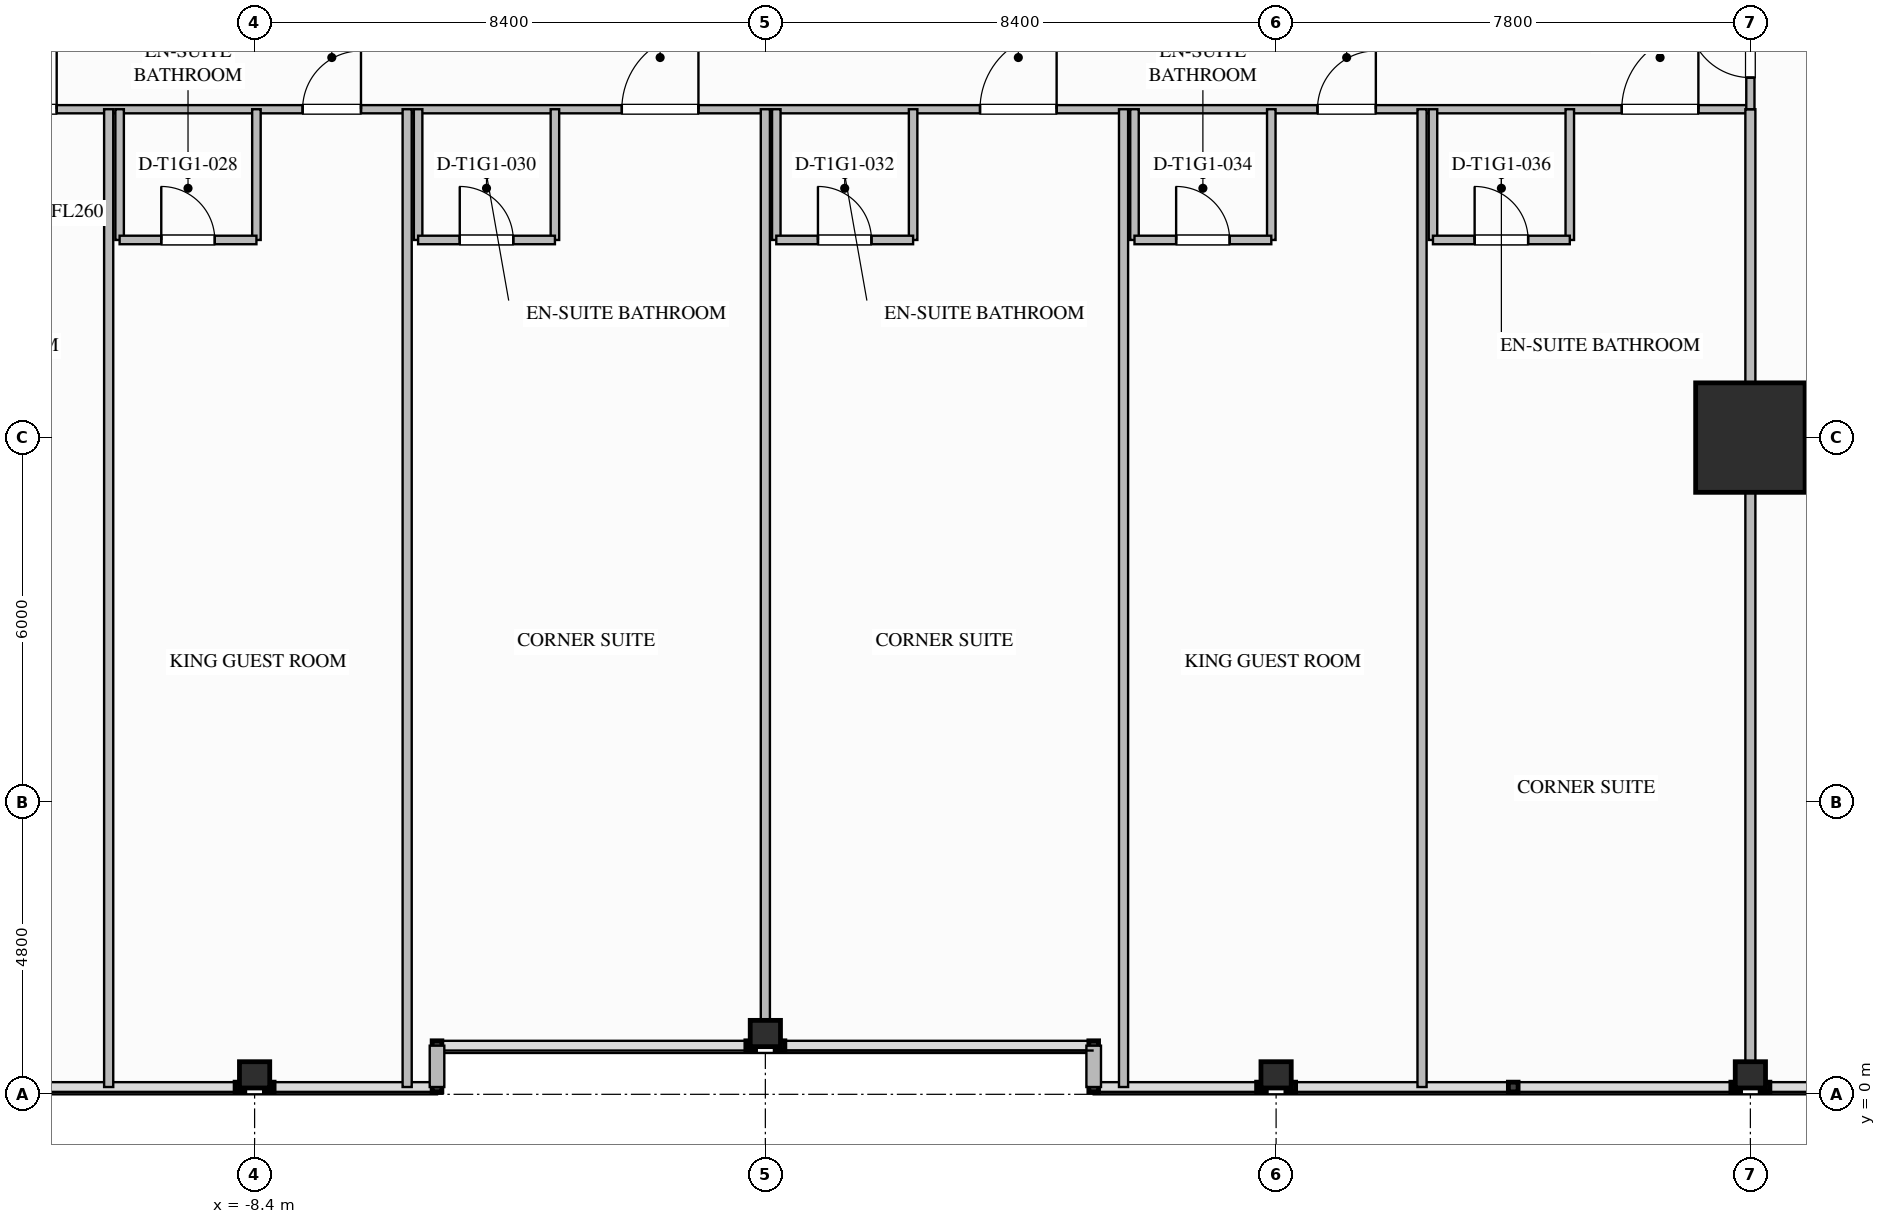
"""IFC4 building model, lengths in metres.
Left out: names, types, materials, properties, quantities, classifications, styles, units other than length and angle.
Written with IfcOpenShell. Run it as: python <this file> out.ifc"""

import sys

from ifc_helpers import new_model, si_unit, direction, frame, frame_2d, origin, origin_2d, place, context, subcontext, project, spatial, rectangle, i_section, extrude, element, fill, save


model = new_model("IFC4")
c1 = context("Model", 3, precision=1e-05, world=origin(), true_north=direction((0.0, 1.0)))
c2 = subcontext(c1, "Body", "Model", "MODEL_VIEW")
j1 = project(units=[si_unit("LENGTHUNIT", "METRE"), si_unit("PLANEANGLEUNIT", "RADIAN")], contexts=[c1])
p1 = place(None, origin())
s1 = spatial("IfcSite", under=j1, at=p1, CompositionType="ELEMENT")
p2 = place(p1, origin())
s2 = spatial("IfcBuilding", under=s1, at=p2, CompositionType="ELEMENT")
p3 = place(p2, frame((0.0, 0.0, 36.7)))
s3 = spatial("IfcBuildingStorey", under=s2, at=p3, CompositionType="ELEMENT", Elevation=36.7)
p4 = place(p3, frame((16.2, 10.8, 0.0), z_axis=(0.0, 0.0, 1.0), x_axis=(1.0, 0.0, 0.0)))
e1 = element("IfcColumn", 1, at=p4, inside=s3, PredefinedType="COLUMN", context=c2, shape_type="SweptSolid", body=[
    extrude(rectangle(XDim=1.8, YDim=1.8, at=origin_2d()), origin(), (0.0, 0.0, 1.0), 3.5),
])
for number, where, z_axis, x_axis in (
    (2, (-8.4, 0.32, 0.0), (0.0, 0.0, 1.0), (0.0, 1.0, 0.0)),
    (3, (0.0, 1.0, 0.0), (0.0, 0.0, 1.0), (0.0, 1.0, 0.0)),
    (4, (8.4, 0.32, 0.0), (0.0, 0.0, 1.0), (0.0, 1.0, 0.0)),
    (5, (16.2, 0.32, 0.0), (0.0, 0.0, 1.0), (0.0, 1.0, 0.0)),
):
    element("IfcColumn", number, at=place(p3, frame(where, z_axis=z_axis, x_axis=x_axis)), inside=s3, PredefinedType="COLUMN", context=c2, shape_type="SweptSolid", body=[
        extrude(i_section(OverallWidth=0.432, OverallDepth=0.498, WebThickness=0.056, FlangeThickness=0.089, FilletRadius=0.03, at=origin_2d()), origin(), (0.0, 0.0, 1.0), 3.497),
    ])
for number, where, z_axis, x_axis in (
    (6, (5.4, 0.12, 0.0), (0.0, 0.0, 1.0), (0.0, 1.0, 0.0)),
    (7, (-5.4, 0.8, 0.0), (0.0, 0.0, 1.0), (0.0, -1.0, 0.0)),
):
    element("IfcWall", number, at=place(p3, frame(where, z_axis=z_axis, x_axis=x_axis)), inside=s3, PredefinedType="STANDARD", context=c2, shape_type="SweptSolid", body=[
        extrude(rectangle(XDim=0.68, YDim=0.24, at=frame_2d((0.34, 0.0))), origin(), (0.0, 0.0, 1.0), 3.24),
    ])
p5 = place(p3, frame((-16.2, 16.2, 0.0), z_axis=(0.0, 0.0, 1.0), x_axis=(1.0, 0.0, 0.0)))
e8 = element("IfcWall", 8, at=p5, inside=s3, PredefinedType="PARTITIONING", context=c2, shape_type="SweptSolid", body=[
    extrude(rectangle(XDim=32.4, YDim=0.135, at=frame_2d((16.2, 0.0))), origin(), (0.0, 0.0, 1.0), 3.24),
])
p6 = place(p5, frame((3.285, 0.0, 0.0)))
e9 = element("IfcOpeningElement", 9, at=p6, cuts=e8, PredefinedType="OPENING", context=c2, shape_type="SweptSolid", body=[
    extrude(rectangle(XDim=1.26, YDim=2.2, at=frame_2d((0.63, 1.1))), frame((0.0, 0.077, 0.0), z_axis=(0.0, -1.0, 0.0), x_axis=(1.0, 0.0, 0.0)), (0.0, 0.0, 1.0), 0.155),
])
p7 = place(p5, frame((8.59, 0.0, 0.0)))
e10 = element("IfcOpeningElement", 10, at=p7, cuts=e8, PredefinedType="OPENING", context=c2, shape_type="SweptSolid", body=[
    extrude(rectangle(XDim=0.96, YDim=2.15, at=frame_2d((0.48, 1.075))), frame((0.0, 0.077, 0.0), z_axis=(0.0, -1.0, 0.0), x_axis=(1.0, 0.0, 0.0)), (0.0, 0.0, 1.0), 0.155),
])
p8 = place(p5, frame((13.84, 0.0, 0.0)))
e11 = element("IfcOpeningElement", 11, at=p8, cuts=e8, PredefinedType="OPENING", context=c2, shape_type="SweptSolid", body=[
    extrude(rectangle(XDim=1.26, YDim=2.2, at=frame_2d((0.63, 1.1))), frame((0.0, 0.077, 0.0), z_axis=(0.0, -1.0, 0.0), x_axis=(1.0, 0.0, 0.0)), (0.0, 0.0, 1.0), 0.155),
])
p9 = place(p5, frame((19.73, 0.0, 0.0)))
e12 = element("IfcOpeningElement", 12, at=p9, cuts=e8, PredefinedType="OPENING", context=c2, shape_type="SweptSolid", body=[
    extrude(rectangle(XDim=1.26, YDim=2.2, at=frame_2d((0.63, 1.1))), frame((0.0, 0.077, 0.0), z_axis=(0.0, -1.0, 0.0), x_axis=(1.0, 0.0, 0.0)), (0.0, 0.0, 1.0), 0.155),
])
p10 = place(p5, frame((25.281, 0.0, 0.0)))
e13 = element("IfcOpeningElement", 13, at=p10, cuts=e8, PredefinedType="OPENING", context=c2, shape_type="SweptSolid", body=[
    extrude(rectangle(XDim=0.96, YDim=2.15, at=frame_2d((0.48, 1.075))), frame((0.0, 0.077, 0.0), z_axis=(0.0, -1.0, 0.0), x_axis=(1.0, 0.0, 0.0)), (0.0, 0.0, 1.0), 0.155),
])
p11 = place(p5, frame((30.285, 0.0, 0.0)))
e14 = element("IfcOpeningElement", 14, at=p11, cuts=e8, PredefinedType="OPENING", context=c2, shape_type="SweptSolid", body=[
    extrude(rectangle(XDim=1.26, YDim=2.2, at=frame_2d((0.63, 1.1))), frame((0.0, 0.077, 0.0), z_axis=(0.0, -1.0, 0.0), x_axis=(1.0, 0.0, 0.0)), (0.0, 0.0, 1.0), 0.155),
])
p12 = place(p3, frame((16.2, 0.12, 0.0), z_axis=(0.0, 0.0, 1.0), x_axis=(0.0, 1.0, 0.0)))
e15 = element("IfcWall", 15, at=p12, inside=s3, PredefinedType="PARTITIONING", context=c2, shape_type="SweptSolid", body=[
    extrude(rectangle(XDim=16.08, YDim=0.165, at=frame_2d((8.04, 0.0))), origin(), (0.0, 0.0, 1.0), 2.298),
])
p13 = place(p3, frame((16.2, 16.2, 0.0), z_axis=(0.0, 0.0, 1.0), x_axis=(0.0, 1.0, 0.0)))
e16 = element("IfcWall", 16, at=p13, inside=s3, PredefinedType="PARTITIONING", context=c2, shape_type="SweptSolid", body=[
    extrude(rectangle(XDim=2.1, YDim=0.135, at=frame_2d((1.05, 0.0))), origin(), (0.0, 0.0, 1.0), 2.298),
])
p14 = place(p13, frame((0.52, 0.0, 0.0)))
e17 = element("IfcOpeningElement", 17, at=p14, cuts=e16, PredefinedType="OPENING", context=c2, shape_type="SweptSolid", body=[
    extrude(rectangle(XDim=1.02, YDim=2.15, at=frame_2d((0.51, 1.075))), frame((0.0, 0.077, 0.0), z_axis=(0.0, -1.0, 0.0), x_axis=(1.0, 0.0, 0.0)), (0.0, 0.0, 1.0), 0.155),
])
p15 = place(p3, frame((-10.8, 0.12, 0.0), z_axis=(0.0, 0.0, 1.0), x_axis=(0.0, 1.0, 0.0)))
e18 = element("IfcWall", 18, at=p15, inside=s3, PredefinedType="PARTITIONING", context=c2, shape_type="SweptSolid", body=[
    extrude(rectangle(XDim=16.08, YDim=0.15, at=frame_2d((8.04, 0.0))), origin(), (0.0, 0.0, 1.0), 3.24),
])
p16 = place(p3, frame((-10.62, 16.2, 0.0), z_axis=(0.0, 0.0, 1.0), x_axis=(0.0, -1.0, 0.0)))
e19 = element("IfcWall", 19, at=p16, inside=s3, PredefinedType="PLUMBINGWALL", context=c2, shape_type="SweptSolid", body=[
    extrude(rectangle(XDim=2.15, YDim=0.14, at=frame_2d((1.075, 0.0))), origin(), (0.0, 0.0, 1.0), 3.24),
])
p17 = place(p3, frame((-8.37, 16.2, 0.0), z_axis=(0.0, 0.0, 1.0), x_axis=(0.0, -1.0, 0.0)))
e20 = element("IfcWall", 20, at=p17, inside=s3, PredefinedType="PLUMBINGWALL", context=c2, shape_type="SweptSolid", body=[
    extrude(rectangle(XDim=2.15, YDim=0.14, at=frame_2d((1.075, 0.0))), origin(), (0.0, 0.0, 1.0), 2.617),
])
p18 = place(p3, frame((-10.62, 14.05, 0.0), z_axis=(0.0, 0.0, 1.0), x_axis=(1.0, 0.0, 0.0)))
e21 = element("IfcWall", 21, at=p18, inside=s3, PredefinedType="PLUMBINGWALL", context=c2, shape_type="SweptSolid", body=[
    extrude(rectangle(XDim=2.25, YDim=0.14, at=frame_2d((1.125, 0.0))), origin(), (0.0, 0.0, 1.0), 3.24),
])
p19 = place(p18, frame((0.685, 0.0, 0.0)))
e22 = element("IfcOpeningElement", 22, at=p19, cuts=e21, PredefinedType="OPENING", context=c2, shape_type="SweptSolid", body=[
    extrude(rectangle(XDim=0.88, YDim=2.1, at=frame_2d((0.44, 1.05))), frame((0.0, 0.08, 0.0), z_axis=(0.0, -1.0, 0.0), x_axis=(1.0, 0.0, 0.0)), (0.0, 0.0, 1.0), 0.16),
])
p20 = place(p3, frame((-5.891, 0.12, 0.0), z_axis=(0.0, 0.0, 1.0), x_axis=(0.0, 1.0, 0.0)))
e23 = element("IfcWall", 23, at=p20, inside=s3, PredefinedType="PARTITIONING", context=c2, shape_type="SweptSolid", body=[
    extrude(rectangle(XDim=16.08, YDim=0.15, at=frame_2d((8.04, 0.0))), origin(), (0.0, 0.0, 1.0), 3.24),
])
for number, where, z_axis, x_axis in (
    (24, (-5.711, 16.2, 0.0), (0.0, 0.0, 1.0), (0.0, -1.0, 0.0)),
    (25, (-3.461, 16.2, 0.0), (0.0, 0.0, 1.0), (0.0, -1.0, 0.0)),
):
    element("IfcWall", number, at=place(p3, frame(where, z_axis=z_axis, x_axis=x_axis)), inside=s3, PredefinedType="PLUMBINGWALL", context=c2, shape_type="SweptSolid", body=[
        extrude(rectangle(XDim=2.15, YDim=0.14, at=frame_2d((1.075, 0.0))), origin(), (0.0, 0.0, 1.0), 3.24),
    ])
p21 = place(p3, frame((-5.711, 14.05, 0.0), z_axis=(0.0, 0.0, 1.0), x_axis=(1.0, 0.0, 0.0)))
e26 = element("IfcWall", 26, at=p21, inside=s3, PredefinedType="PLUMBINGWALL", context=c2, shape_type="SweptSolid", body=[
    extrude(rectangle(XDim=2.25, YDim=0.14, at=frame_2d((1.125, 0.0))), origin(), (0.0, 0.0, 1.0), 3.24),
])
p22 = place(p21, frame((0.685, 0.0, 0.0)))
e27 = element("IfcOpeningElement", 27, at=p22, cuts=e26, PredefinedType="OPENING", context=c2, shape_type="SweptSolid", body=[
    extrude(rectangle(XDim=0.88, YDim=2.1, at=frame_2d((0.44, 1.05))), frame((0.0, 0.08, 0.0), z_axis=(0.0, -1.0, 0.0), x_axis=(1.0, 0.0, 0.0)), (0.0, 0.0, 1.0), 0.16),
])
p23 = place(p3, frame((0.0, 0.8, 0.0), z_axis=(0.0, 0.0, 1.0), x_axis=(0.0, 1.0, 0.0)))
e28 = element("IfcWall", 28, at=p23, inside=s3, PredefinedType="PARTITIONING", context=c2, shape_type="SweptSolid", body=[
    extrude(rectangle(XDim=15.4, YDim=0.15, at=frame_2d((7.7, 0.0))), origin(), (0.0, 0.0, 1.0), 2.298),
])
p24 = place(p3, frame((0.18, 16.2, 0.0), z_axis=(0.0, 0.0, 1.0), x_axis=(0.0, -1.0, 0.0)))
e29 = element("IfcWall", 29, at=p24, inside=s3, PredefinedType="PLUMBINGWALL", context=c2, shape_type="SweptSolid", body=[
    extrude(rectangle(XDim=2.15, YDim=0.14, at=frame_2d((1.075, 0.0))), origin(), (0.0, 0.0, 1.0), 2.617),
])
p25 = place(p3, frame((2.43, 16.2, 0.0), z_axis=(0.0, 0.0, 1.0), x_axis=(0.0, -1.0, 0.0)))
e30 = element("IfcWall", 30, at=p25, inside=s3, PredefinedType="PLUMBINGWALL", context=c2, shape_type="SweptSolid", body=[
    extrude(rectangle(XDim=2.15, YDim=0.14, at=frame_2d((1.075, 0.0))), origin(), (0.0, 0.0, 1.0), 3.24),
])
p26 = place(p3, frame((0.18, 14.05, 0.0), z_axis=(0.0, 0.0, 1.0), x_axis=(1.0, 0.0, 0.0)))
e31 = element("IfcWall", 31, at=p26, inside=s3, PredefinedType="PLUMBINGWALL", context=c2, shape_type="SweptSolid", body=[
    extrude(rectangle(XDim=2.25, YDim=0.14, at=frame_2d((1.125, 0.0))), origin(), (0.0, 0.0, 1.0), 3.24),
])
p27 = place(p26, frame((0.685, 0.0, 0.0)))
e32 = element("IfcOpeningElement", 32, at=p27, cuts=e31, PredefinedType="OPENING", context=c2, shape_type="SweptSolid", body=[
    extrude(rectangle(XDim=0.88, YDim=2.1, at=frame_2d((0.44, 1.05))), frame((0.0, 0.08, 0.0), z_axis=(0.0, -1.0, 0.0), x_axis=(1.0, 0.0, 0.0)), (0.0, 0.0, 1.0), 0.16),
])
p28 = place(p3, frame((5.891, 0.12, 0.0), z_axis=(0.0, 0.0, 1.0), x_axis=(0.0, 1.0, 0.0)))
e33 = element("IfcWall", 33, at=p28, inside=s3, PredefinedType="PARTITIONING", context=c2, shape_type="SweptSolid", body=[
    extrude(rectangle(XDim=16.08, YDim=0.15, at=frame_2d((8.04, 0.0))), origin(), (0.0, 0.0, 1.0), 3.24),
])
p29 = place(p3, frame((6.071, 16.2, 0.0), z_axis=(0.0, 0.0, 1.0), x_axis=(0.0, -1.0, 0.0)))
e34 = element("IfcWall", 34, at=p29, inside=s3, PredefinedType="PLUMBINGWALL", context=c2, shape_type="SweptSolid", body=[
    extrude(rectangle(XDim=2.15, YDim=0.14, at=frame_2d((1.075, 0.0))), origin(), (0.0, 0.0, 1.0), 3.24),
])
p30 = place(p3, frame((8.321, 16.2, 0.0), z_axis=(0.0, 0.0, 1.0), x_axis=(0.0, -1.0, 0.0)))
e35 = element("IfcWall", 35, at=p30, inside=s3, PredefinedType="PLUMBINGWALL", context=c2, shape_type="SweptSolid", body=[
    extrude(rectangle(XDim=2.15, YDim=0.14, at=frame_2d((1.075, 0.0))), origin(), (0.0, 0.0, 1.0), 2.617),
])
p31 = place(p3, frame((6.071, 14.05, 0.0), z_axis=(0.0, 0.0, 1.0), x_axis=(1.0, 0.0, 0.0)))
e36 = element("IfcWall", 36, at=p31, inside=s3, PredefinedType="PLUMBINGWALL", context=c2, shape_type="SweptSolid", body=[
    extrude(rectangle(XDim=2.25, YDim=0.14, at=frame_2d((1.125, 0.0))), origin(), (0.0, 0.0, 1.0), 3.24),
])
p32 = place(p31, frame((0.685, 0.0, 0.0)))
e37 = element("IfcOpeningElement", 37, at=p32, cuts=e36, PredefinedType="OPENING", context=c2, shape_type="SweptSolid", body=[
    extrude(rectangle(XDim=0.88, YDim=2.1, at=frame_2d((0.44, 1.05))), frame((0.0, 0.08, 0.0), z_axis=(0.0, -1.0, 0.0), x_axis=(1.0, 0.0, 0.0)), (0.0, 0.0, 1.0), 0.16),
])
p33 = place(p3, frame((10.8, 0.12, 0.0), z_axis=(0.0, 0.0, 1.0), x_axis=(0.0, 1.0, 0.0)))
e38 = element("IfcWall", 38, at=p33, inside=s3, PredefinedType="PARTITIONING", context=c2, shape_type="SweptSolid", body=[
    extrude(rectangle(XDim=16.08, YDim=0.15, at=frame_2d((8.04, 0.0))), origin(), (0.0, 0.0, 1.0), 3.24),
])
for number, where, z_axis, x_axis in (
    (39, (10.98, 16.2, 0.0), (0.0, 0.0, 1.0), (0.0, -1.0, 0.0)),
    (40, (13.23, 16.2, 0.0), (0.0, 0.0, 1.0), (0.0, -1.0, 0.0)),
):
    element("IfcWall", number, at=place(p3, frame(where, z_axis=z_axis, x_axis=x_axis)), inside=s3, PredefinedType="PLUMBINGWALL", context=c2, shape_type="SweptSolid", body=[
        extrude(rectangle(XDim=2.15, YDim=0.14, at=frame_2d((1.075, 0.0))), origin(), (0.0, 0.0, 1.0), 3.24),
    ])
p34 = place(p3, frame((10.98, 14.05, 0.0), z_axis=(0.0, 0.0, 1.0), x_axis=(1.0, 0.0, 0.0)))
e41 = element("IfcWall", 41, at=p34, inside=s3, PredefinedType="PLUMBINGWALL", context=c2, shape_type="SweptSolid", body=[
    extrude(rectangle(XDim=2.25, YDim=0.14, at=frame_2d((1.125, 0.0))), origin(), (0.0, 0.0, 1.0), 3.24),
])
p35 = place(p34, frame((0.685, 0.0, 0.0)))
e42 = element("IfcOpeningElement", 42, at=p35, cuts=e41, PredefinedType="OPENING", context=c2, shape_type="SweptSolid", body=[
    extrude(rectangle(XDim=0.88, YDim=2.1, at=frame_2d((0.44, 1.05))), frame((0.0, 0.08, 0.0), z_axis=(0.0, -1.0, 0.0), x_axis=(1.0, 0.0, 0.0)), (0.0, 0.0, 1.0), 0.16),
])
p36 = place(p14, origin())
e43 = element("IfcDoor", 43, at=p36, inside=s3, OperationType="SINGLE_SWING_RIGHT", PredefinedType="DOOR", context=c2, shape_type="SweptSolid", body=[
    extrude(rectangle(XDim=1.02, YDim=2.15, at=frame_2d((0.51, 1.075))), frame((0.0, 0.025, 0.0), z_axis=(0.0, -1.0, 0.0), x_axis=(1.0, 0.0, 0.0)), (0.0, 0.0, 1.0), 0.05),
])
fill(e17, e43)
p37 = place(p6, origin())
e44 = element("IfcDoor", 44, at=p37, inside=s3, OperationType="SINGLE_SWING_RIGHT", PredefinedType="DOOR", context=c2, shape_type="SweptSolid", body=[
    extrude(rectangle(XDim=1.26, YDim=2.2, at=frame_2d((0.63, 1.1))), frame((0.0, 0.025, 0.0), z_axis=(0.0, -1.0, 0.0), x_axis=(1.0, 0.0, 0.0)), (0.0, 0.0, 1.0), 0.05),
])
fill(e9, e44)
p38 = place(p19, origin())
e45 = element("IfcDoor", 45, at=p38, inside=s3, OperationType="SINGLE_SWING_LEFT", PredefinedType="DOOR", context=c2, shape_type="SweptSolid", body=[
    extrude(rectangle(XDim=0.88, YDim=2.1, at=frame_2d((0.44, 1.05))), frame((0.0, 0.025, 0.0), z_axis=(0.0, -1.0, 0.0), x_axis=(1.0, 0.0, 0.0)), (0.0, 0.0, 1.0), 0.05),
])
fill(e22, e45)
p39 = place(p7, origin())
e46 = element("IfcDoor", 46, at=p39, inside=s3, OperationType="SINGLE_SWING_RIGHT", PredefinedType="DOOR", context=c2, shape_type="SweptSolid", body=[
    extrude(rectangle(XDim=0.96, YDim=2.15, at=frame_2d((0.48, 1.075))), frame((0.0, 0.025, 0.0), z_axis=(0.0, -1.0, 0.0), x_axis=(1.0, 0.0, 0.0)), (0.0, 0.0, 1.0), 0.05),
])
fill(e10, e46)
p40 = place(p22, origin())
e47 = element("IfcDoor", 47, at=p40, inside=s3, OperationType="SINGLE_SWING_LEFT", PredefinedType="DOOR", context=c2, shape_type="SweptSolid", body=[
    extrude(rectangle(XDim=0.88, YDim=2.1, at=frame_2d((0.44, 1.05))), frame((0.0, 0.025, 0.0), z_axis=(0.0, -1.0, 0.0), x_axis=(1.0, 0.0, 0.0)), (0.0, 0.0, 1.0), 0.05),
])
fill(e27, e47)
p41 = place(p8, origin())
e48 = element("IfcDoor", 48, at=p41, inside=s3, OperationType="SINGLE_SWING_RIGHT", PredefinedType="DOOR", context=c2, shape_type="SweptSolid", body=[
    extrude(rectangle(XDim=1.26, YDim=2.2, at=frame_2d((0.63, 1.1))), frame((0.0, 0.025, 0.0), z_axis=(0.0, -1.0, 0.0), x_axis=(1.0, 0.0, 0.0)), (0.0, 0.0, 1.0), 0.05),
])
fill(e11, e48)
p42 = place(p27, origin())
e49 = element("IfcDoor", 49, at=p42, inside=s3, OperationType="SINGLE_SWING_LEFT", PredefinedType="DOOR", context=c2, shape_type="SweptSolid", body=[
    extrude(rectangle(XDim=0.88, YDim=2.1, at=frame_2d((0.44, 1.05))), frame((0.0, 0.025, 0.0), z_axis=(0.0, -1.0, 0.0), x_axis=(1.0, 0.0, 0.0)), (0.0, 0.0, 1.0), 0.05),
])
fill(e32, e49)
p43 = place(p9, origin())
e50 = element("IfcDoor", 50, at=p43, inside=s3, OperationType="SINGLE_SWING_RIGHT", PredefinedType="DOOR", context=c2, shape_type="SweptSolid", body=[
    extrude(rectangle(XDim=1.26, YDim=2.2, at=frame_2d((0.63, 1.1))), frame((0.0, 0.025, 0.0), z_axis=(0.0, -1.0, 0.0), x_axis=(1.0, 0.0, 0.0)), (0.0, 0.0, 1.0), 0.05),
])
fill(e12, e50)
p44 = place(p32, origin())
e51 = element("IfcDoor", 51, at=p44, inside=s3, OperationType="SINGLE_SWING_LEFT", PredefinedType="DOOR", context=c2, shape_type="SweptSolid", body=[
    extrude(rectangle(XDim=0.88, YDim=2.1, at=frame_2d((0.44, 1.05))), frame((0.0, 0.025, 0.0), z_axis=(0.0, -1.0, 0.0), x_axis=(1.0, 0.0, 0.0)), (0.0, 0.0, 1.0), 0.05),
])
fill(e37, e51)
p45 = place(p10, origin())
e52 = element("IfcDoor", 52, at=p45, inside=s3, OperationType="SINGLE_SWING_RIGHT", PredefinedType="DOOR", context=c2, shape_type="SweptSolid", body=[
    extrude(rectangle(XDim=0.96, YDim=2.15, at=frame_2d((0.48, 1.075))), frame((0.0, 0.025, 0.0), z_axis=(0.0, -1.0, 0.0), x_axis=(1.0, 0.0, 0.0)), (0.0, 0.0, 1.0), 0.05),
])
fill(e13, e52)
p46 = place(p35, origin())
e53 = element("IfcDoor", 53, at=p46, inside=s3, OperationType="SINGLE_SWING_LEFT", PredefinedType="DOOR", context=c2, shape_type="SweptSolid", body=[
    extrude(rectangle(XDim=0.88, YDim=2.1, at=frame_2d((0.44, 1.05))), frame((0.0, 0.025, 0.0), z_axis=(0.0, -1.0, 0.0), x_axis=(1.0, 0.0, 0.0)), (0.0, 0.0, 1.0), 0.05),
])
fill(e42, e53)
p47 = place(p11, origin())
e54 = element("IfcDoor", 54, at=p47, inside=s3, OperationType="SINGLE_SWING_RIGHT", PredefinedType="DOOR", context=c2, shape_type="SweptSolid", body=[
    extrude(rectangle(XDim=1.26, YDim=2.2, at=frame_2d((0.63, 1.1))), frame((0.0, 0.025, 0.0), z_axis=(0.0, -1.0, 0.0), x_axis=(1.0, 0.0, 0.0)), (0.0, 0.0, 1.0), 0.05),
])
fill(e14, e54)
save(model, sys.argv[1])
